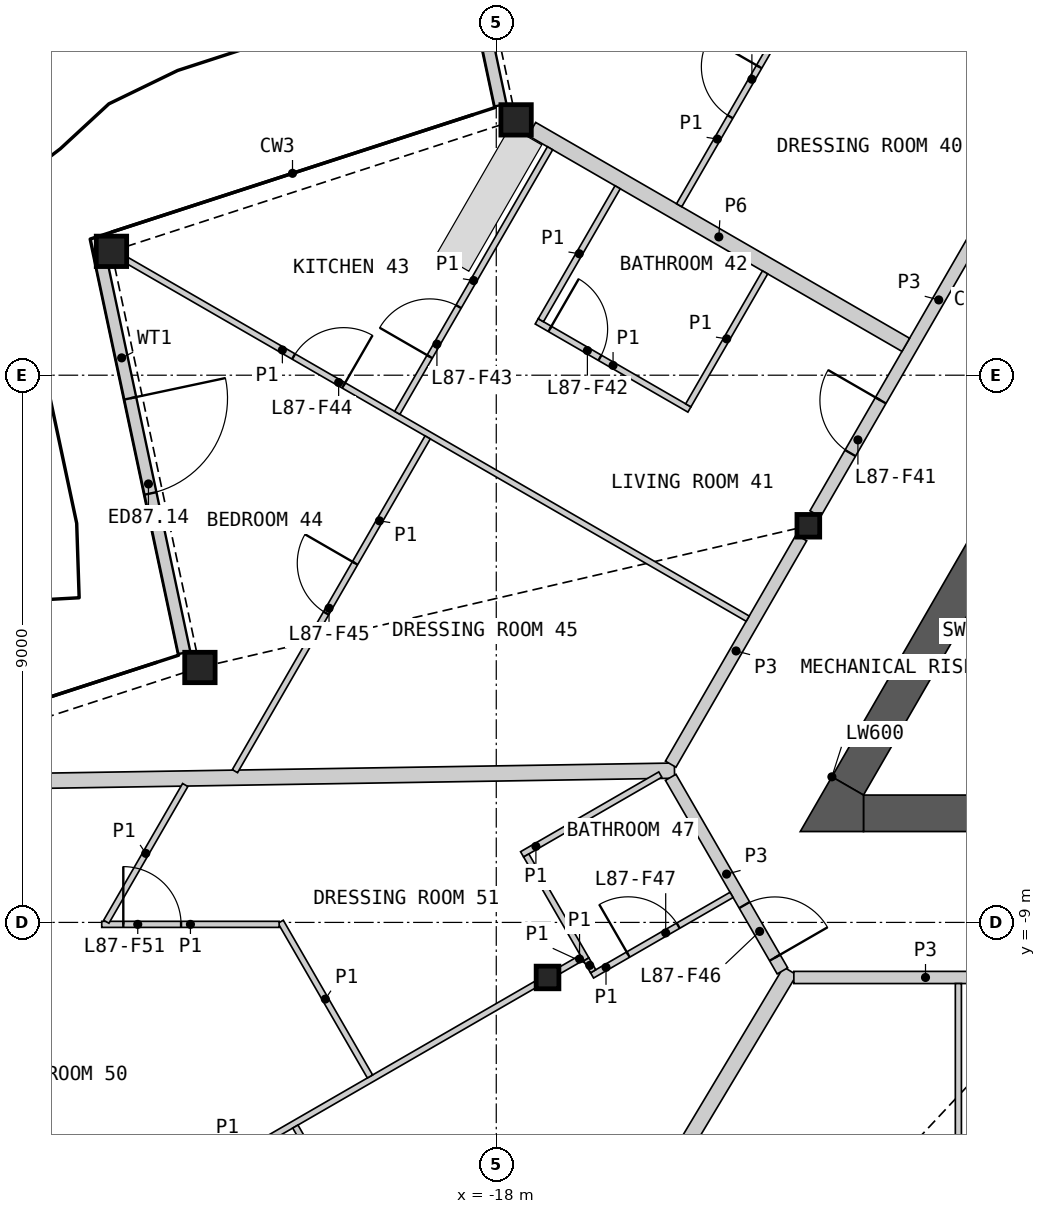
"""IFC4 building model, lengths in metres.
Left out: names, types, materials, properties, quantities, classifications, styles, units other than length and angle.
Written with IfcOpenShell. Run it as: python <this file> out.ifc"""

import sys

from ifc_helpers import new_model, si_unit, direction, frame, frame_2d, origin, origin_2d, place, context, subcontext, project, spatial, polyline, rectangle, hollow_rectangle, i_section, outline, extrude, element, fill, save


model = new_model("IFC4")
c1 = context("Model", 3, precision=1e-05, world=origin(), true_north=direction((0.0, 1.0)))
c2 = subcontext(c1, "Body", "Model", "MODEL_VIEW")
j1 = project(units=[si_unit("LENGTHUNIT", "METRE"), si_unit("PLANEANGLEUNIT", "RADIAN")], contexts=[c1])
p1 = place(None, origin())
s1 = spatial("IfcSite", under=j1, at=p1, CompositionType="ELEMENT")
p2 = place(p1, origin())
s2 = spatial("IfcBuilding", under=s1, at=p2, CompositionType="ELEMENT")
p3 = place(p2, frame((0.0, 0.0, 384.8)))
s3 = spatial("IfcBuildingStorey", under=s2, at=p3, CompositionType="ELEMENT", Elevation=384.8)
for number, where, z_axis, x_axis in (
    (1, (-17.674, 4.199, 0.0), (0.0, 0.0, 1.0), (1.0, 0.0, 0.0)),
    (2, (-24.329, 2.037, 0.0), (0.0, 0.0, 1.0), (1.0, 0.0, 0.0)),
    (3, (-22.874, -4.807, 0.0), (0.0, 0.0, 1.0), (1.0, 0.0, 0.0)),
):
    element("IfcColumn", number, at=place(p3, frame(where, z_axis=z_axis, x_axis=x_axis)), inside=s3, PredefinedType="COLUMN", context=c2, shape_type="SweptSolid", body=[
        extrude(hollow_rectangle(XDim=0.5, YDim=0.5, WallThickness=0.03, at=origin_2d()), origin(), (0.0, 0.0, 1.0), 3.4),
    ])
for number, where, z_axis, x_axis in (
    (4, (-12.868, -2.476, 0.0), (0.0, 0.0, 1.0), (1.0, 0.0, 0.0)),
    (5, (-17.157, -9.906, 0.0), (0.0, 0.0, 1.0), (1.0, 0.0, 0.0)),
):
    element("IfcColumn", number, at=place(p3, frame(where, z_axis=z_axis, x_axis=x_axis)), inside=s3, PredefinedType="COLUMN", context=c2, shape_type="SweptSolid", body=[
        extrude(i_section(OverallWidth=0.374, OverallDepth=0.372, WebThickness=0.016, FlangeThickness=0.026, at=origin_2d()), origin(), (0.0, 0.0, 1.0), 3.4),
    ])
p4 = place(p3, frame((-19.304, 10.909, 0.0), z_axis=(0.0, 0.0, 1.0), x_axis=(0.207882161022, -0.97815387702, 0.0)))
e6 = element("IfcWall", 6, at=p4, inside=s3, PredefinedType="SOLIDWALL", context=c2, shape_type="SweptSolid", body=[
    extrude(rectangle(XDim=6.612, YDim=0.2, at=frame_2d((3.306, 0.0))), origin(), (0.0, 0.0, 1.0), 2.634),
])
p5 = place(p4, frame((2.333, 0.0, 0.0)))
e7 = element("IfcOpeningElement", 7, at=p5, cuts=e6, PredefinedType="OPENING", context=c2, shape_type="SweptSolid", body=[
    extrude(rectangle(XDim=1.6, YDim=2.25, at=frame_2d((0.8, 1.125))), frame((0.0, 0.11, 0.0), z_axis=(0.0, -1.0, 0.0), x_axis=(1.0, 0.0, 0.0)), (0.0, 0.0, 1.0), 0.22),
])
p6 = place(p3, frame((-24.505, 1.902, 0.0), z_axis=(0.0, 0.0, 1.0), x_axis=(0.207917488951, -0.978146368285, 0.0)))
e8 = element("IfcWall", 8, at=p6, inside=s3, PredefinedType="SOLIDWALL", context=c2, shape_type="SweptSolid", body=[
    extrude(rectangle(XDim=6.612, YDim=0.2, at=frame_2d((3.306, 0.0))), origin(), (0.0, 0.0, 1.0), 2.634),
])
p7 = place(p6, frame((2.333, 0.0, 0.0)))
e9 = element("IfcOpeningElement", 9, at=p7, cuts=e8, PredefinedType="OPENING", context=c2, shape_type="SweptSolid", body=[
    extrude(rectangle(XDim=1.6, YDim=2.25, at=frame_2d((0.8, 1.125))), frame((0.0, 0.11, 0.0), z_axis=(0.0, -1.0, 0.0), x_axis=(1.0, 0.0, 0.0)), (0.0, 0.0, 1.0), 0.22),
])
p8 = place(p3, origin())
e10 = element("IfcWall", 10, at=p8, inside=s3, PredefinedType="SHEAR", context=c2, shape_type="SweptSolid", body=[
    extrude(outline(polyline([(-5.307, -1.281), (-10.374, -4.206), (-10.032, -4.298), (-5.182, -1.498), (-5.307, -1.281)])), origin(), (0.0, 0.0, 1.0), 3.1),
])
p9 = place(p3, origin())
e11 = element("IfcWall", 11, at=p9, inside=s3, PredefinedType="SHEAR", context=c2, shape_type="SweptSolid", body=[
    extrude(outline(polyline([(-10.374, -4.206), (-8.83, -6.881), (-8.738, -6.539), (-10.032, -4.298), (-10.374, -4.206)])), origin(), (0.0, 0.0, 1.0), 3.1),
])
p10 = place(p3, frame((-11.961, -7.206, 0.0), z_axis=(0.0, 0.0, 1.0), x_axis=(1.0, 0.0, 0.0)))
e12 = element("IfcWall", 12, at=p10, inside=s3, PredefinedType="SHEAR", context=c2, shape_type="SweptSolid", body=[
    extrude(rectangle(XDim=4.868, YDim=0.6, at=frame_2d((2.434, 0.0))), origin(), (0.0, 0.0, 1.0), 3.1),
])
p11 = place(p3, frame((-9.562, -2.15, 0.0), z_axis=(0.0, 0.0, 1.0), x_axis=(-0.500015214976, -0.866016619236, 0.0)))
e13 = element("IfcWall", 13, at=p11, inside=s3, PredefinedType="SHEAR", context=c2, shape_type="SweptSolid", body=[
    extrude(rectangle(XDim=5.318, YDim=0.6, at=frame_2d((2.659, 0.0))), origin(), (0.0, 0.0, 1.0), 3.1),
])
p12 = place(p3, origin())
e14 = element("IfcWall", 14, at=p12, inside=s3, PredefinedType="SHEAR", context=c2, shape_type="SweptSolid", body=[
    extrude(outline(polyline([(-12.48, -6.606), (-11.961, -6.906), (-11.961, -7.506), (-13.0, -7.506), (-12.48, -6.606)])), origin(), (0.0, 0.0, 1.0), 3.1),
])
p13 = place(p3, frame((-20.338, -21.771, 0.0), z_axis=(0.0, 0.0, 1.0), x_axis=(0.513878217441, 0.857863146218, 0.0)))
e15 = element("IfcWall", 15, at=p13, inside=s3, PredefinedType="PARTITIONING", context=c2, shape_type="SweptSolid", body=[
    extrude(rectangle(XDim=13.956, YDim=0.25, at=frame_2d((6.978, 0.0))), origin(), (0.0, 0.0, 1.0), 2.33),
])
p14 = place(p3, frame((-29.269, -6.732, 0.0), z_axis=(0.0, 0.0, 1.0), x_axis=(0.999870533117, 0.016090898164, 0.0)))
e16 = element("IfcWall", 16, at=p14, inside=s3, PredefinedType="PARTITIONING", context=c2, shape_type="SweptSolid", body=[
    extrude(rectangle(XDim=14.202, YDim=0.25, at=frame_2d((7.101, 0.0))), origin(), (0.0, 0.0, 1.0), 2.33),
])
p15 = place(p3, frame((-12.754, -2.279, 0.0), z_axis=(0.0, 0.0, 1.0), x_axis=(0.500001682468, 0.866024432409, 0.0)))
e17 = element("IfcWall", 17, at=p15, inside=s3, PredefinedType="PARTITIONING", context=c2, shape_type="SweptSolid", body=[
    extrude(rectangle(XDim=8.124, YDim=0.2, at=frame_2d((4.062, 0.0))), origin(), (0.0, 0.0, 1.0), 3.1),
])
p16 = place(p15, frame((1.153, 0.0, 0.0)))
e18 = element("IfcOpeningElement", 18, at=p16, cuts=e17, PredefinedType="OPENING", context=c2, shape_type="SweptSolid", body=[
    extrude(rectangle(XDim=1.0, YDim=2.1, at=frame_2d((0.5, 1.05))), frame((0.0, 0.11, 0.0), z_axis=(0.0, -1.0, 0.0), x_axis=(1.0, 0.0, 0.0)), (0.0, 0.0, 1.0), 0.22),
])
p17 = place(p3, frame((-17.414, 4.049, 0.0), z_axis=(0.0, 0.0, 1.0), x_axis=(0.866033839264, -0.499985389037, 0.0)))
e19 = element("IfcWall", 19, at=p17, inside=s3, PredefinedType="PARTITIONING", context=c2, shape_type="SweptSolid", body=[
    extrude(rectangle(XDim=7.1, YDim=0.25, at=frame_2d((3.55, 0.0))), origin(), (0.0, 0.0, 1.0), 2.33),
])
p18 = place(p3, frame((-13.106, -9.906, 0.0), z_axis=(0.0, 0.0, 1.0), x_axis=(1.0, 0.0, 0.0)))
e20 = element("IfcWall", 20, at=p18, inside=s3, PredefinedType="PARTITIONING", context=c2, shape_type="SweptSolid", body=[
    extrude(rectangle(XDim=4.331, YDim=0.2, at=frame_2d((2.165, 0.0))), origin(), (0.0, 0.0, 1.0), 3.1),
])
p19 = place(p3, frame((-15.131, -6.397, 0.0), z_axis=(0.0, 0.0, 1.0), x_axis=(0.499986217557, 0.866033360935, 0.0)))
e21 = element("IfcWall", 21, at=p19, inside=s3, PredefinedType="PARTITIONING", context=c2, shape_type="SweptSolid", body=[
    extrude(rectangle(XDim=4.3, YDim=0.2, at=frame_2d((2.15, 0.0))), origin(), (0.0, 0.0, 1.0), 3.1),
])
p20 = place(p3, frame((-15.131, -6.614, 0.0), z_axis=(0.0, 0.0, 1.0), x_axis=(0.499967746641, -0.866044024469, 0.0)))
e22 = element("IfcWall", 22, at=p20, inside=s3, PredefinedType="PARTITIONING", context=c2, shape_type="SweptSolid", body=[
    extrude(rectangle(XDim=3.676, YDim=0.2, at=frame_2d((1.838, 0.0))), origin(), (0.0, 0.0, 1.0), 3.1),
])
p21 = place(p20, frame((2.426, 0.0, 0.0)))
e23 = element("IfcOpeningElement", 23, at=p21, cuts=e22, PredefinedType="OPENING", context=c2, shape_type="SweptSolid", body=[
    extrude(rectangle(XDim=1.0, YDim=2.1, at=frame_2d((0.5, 1.05))), frame((0.0, 0.11, 0.0), z_axis=(0.0, -1.0, 0.0), x_axis=(1.0, 0.0, 0.0)), (0.0, 0.0, 1.0), 0.22),
])
p22 = place(p3, frame((-10.4, -21.828, 0.0), z_axis=(0.0, 0.0, 1.0), x_axis=(0.0, 1.0, 0.0)))
e24 = element("IfcWall", 24, at=p22, inside=s3, PredefinedType="PARTITIONING", context=c2, shape_type="SweptSolid", body=[
    extrude(rectangle(XDim=11.822, YDim=0.1, at=frame_2d((5.911, 0.0))), origin(), (0.0, 0.0, 1.0), 2.33),
])
p23 = place(p22, frame((1.156, 0.0, 0.0)))
e25 = element("IfcOpeningElement", 25, at=p23, cuts=e24, PredefinedType="OPENING", context=c2, shape_type="SweptSolid", body=[
    extrude(rectangle(XDim=0.95, YDim=2.1, at=frame_2d((0.475, 1.05))), frame((0.0, 0.06, 0.0), z_axis=(0.0, -1.0, 0.0), x_axis=(1.0, 0.0, 0.0)), (0.0, 0.0, 1.0), 0.12),
])
p24 = place(p3, frame((-24.069, 1.887, 0.0), z_axis=(0.0, 0.0, 1.0), x_axis=(0.866023404247, -0.500003463284, 0.0)))
e26 = element("IfcWall", 26, at=p24, inside=s3, PredefinedType="PARTITIONING", context=c2, shape_type="SweptSolid", body=[
    extrude(rectangle(XDim=11.782, YDim=0.1, at=frame_2d((5.891, 0.0))), origin(), (0.0, 0.0, 1.0), 2.33),
])
p25 = place(p24, frame((3.159, 0.0, 0.0)))
e27 = element("IfcOpeningElement", 27, at=p25, cuts=e26, PredefinedType="OPENING", context=c2, shape_type="SweptSolid", body=[
    extrude(rectangle(XDim=0.95, YDim=2.1, at=frame_2d((0.475, 1.05))), frame((0.0, 0.06, 0.0), z_axis=(0.0, -1.0, 0.0), x_axis=(1.0, 0.0, 0.0)), (0.0, 0.0, 1.0), 0.12),
])
p26 = place(p3, frame((-18.869, 10.894, 0.0), z_axis=(0.0, 0.0, 1.0), x_axis=(0.866023724155, -0.500002909193, 0.0)))
e28 = element("IfcWall", 28, at=p26, inside=s3, PredefinedType="PARTITIONING", context=c2, shape_type="SweptSolid", body=[
    extrude(rectangle(XDim=11.655, YDim=0.1, at=frame_2d((5.827, 0.0))), origin(), (0.0, 0.0, 1.0), 2.33),
])
p27 = place(p26, frame((6.253, 0.0, 0.0)))
e29 = element("IfcOpeningElement", 29, at=p27, cuts=e28, PredefinedType="OPENING", context=c2, shape_type="SweptSolid", body=[
    extrude(rectangle(XDim=0.95, YDim=2.1, at=frame_2d((0.475, 1.05))), frame((0.0, 0.06, 0.0), z_axis=(0.0, -1.0, 0.0), x_axis=(1.0, 0.0, 0.0)), (0.0, 0.0, 1.0), 0.12),
])
p28 = place(p3, frame((-26.777, -15.46, 0.0), z_axis=(0.0, 0.0, 1.0), x_axis=(0.866019680922, 0.500009912158, 0.0)))
e30 = element("IfcWall", 30, at=p28, inside=s3, PredefinedType="PARTITIONING", context=c2, shape_type="SweptSolid", body=[
    extrude(rectangle(XDim=10.881, YDim=0.1, at=frame_2d((5.44, 0.0))), origin(), (0.0, 0.0, 1.0), 2.33),
])
p29 = place(p28, frame((1.454, 0.0, 0.0)))
e31 = element("IfcOpeningElement", 31, at=p29, cuts=e30, PredefinedType="OPENING", context=c2, shape_type="SweptSolid", body=[
    extrude(rectangle(XDim=0.95, YDim=2.1, at=frame_2d((0.475, 1.05))), frame((0.0, 0.06, 0.0), z_axis=(0.0, -1.0, 0.0), x_axis=(1.0, 0.0, 0.0)), (0.0, 0.0, 1.0), 0.12),
])
p30 = place(p3, frame((-21.304, -12.358, 0.0), z_axis=(0.0, 0.0, 1.0), x_axis=(0.500000558108, -0.866025081561, 0.0)))
e32 = element("IfcWall", 32, at=p30, inside=s3, PredefinedType="PARTITIONING", context=c2, shape_type="SweptSolid", body=[
    extrude(rectangle(XDim=6.358, YDim=0.1, at=frame_2d((3.179, 0.0))), origin(), (0.0, 0.0, 1.0), 2.33),
])
p31 = place(p30, frame((3.555, 0.0, 0.0)))
e33 = element("IfcOpeningElement", 33, at=p31, cuts=e32, PredefinedType="OPENING", context=c2, shape_type="SweptSolid", body=[
    extrude(rectangle(XDim=0.95, YDim=2.1, at=frame_2d((0.475, 1.05))), frame((0.0, 0.06, 0.0), z_axis=(0.0, -1.0, 0.0), x_axis=(1.0, 0.0, 0.0)), (0.0, 0.0, 1.0), 0.12),
])
p32 = place(p3, frame((-22.298, -6.512, 0.0), z_axis=(0.0, 0.0, 1.0), x_axis=(0.499991387631, 0.866030376081, 0.0)))
e34 = element("IfcWall", 34, at=p32, inside=s3, PredefinedType="PARTITIONING", context=c2, shape_type="SweptSolid", body=[
    extrude(rectangle(XDim=6.339, YDim=0.1, at=frame_2d((3.169, 0.0))), origin(), (0.0, 0.0, 1.0), 2.33),
])
p33 = place(p32, frame((3.0, 0.0, 0.0)))
e35 = element("IfcOpeningElement", 35, at=p33, cuts=e34, PredefinedType="OPENING", context=c2, shape_type="SweptSolid", body=[
    extrude(rectangle(XDim=0.95, YDim=2.1, at=frame_2d((0.475, 1.05))), frame((0.0, 0.06, 0.0), z_axis=(0.0, -1.0, 0.0), x_axis=(1.0, 0.0, 0.0)), (0.0, 0.0, 1.0), 0.12),
])
p34 = place(p3, frame((-19.628, -0.619, 0.0), z_axis=(0.0, 0.0, 1.0), x_axis=(0.499990214365, 0.86603105345, 0.0)))
e36 = element("IfcWall", 36, at=p34, inside=s3, PredefinedType="PARTITIONING", context=c2, shape_type="SweptSolid", body=[
    extrude(rectangle(XDim=5.025, YDim=0.1, at=frame_2d((2.512, 0.0))), origin(), (0.0, 0.0, 1.0), 2.33),
])
p35 = place(p34, frame((1.067, 0.0, 0.0)))
e37 = element("IfcOpeningElement", 37, at=p35, cuts=e36, PredefinedType="OPENING", context=c2, shape_type="SweptSolid", body=[
    extrude(rectangle(XDim=0.95, YDim=2.1, at=frame_2d((0.475, 1.05))), frame((0.0, 0.06, 0.0), z_axis=(0.0, -1.0, 0.0), x_axis=(1.0, 0.0, 0.0)), (0.0, 0.0, 1.0), 0.12),
])
p36 = place(p3, frame((-14.992, 2.796, 0.0), z_axis=(0.0, 0.0, 1.0), x_axis=(0.499990214365, 0.86603105345, 0.0)))
e38 = element("IfcWall", 38, at=p36, inside=s3, PredefinedType="PARTITIONING", context=c2, shape_type="SweptSolid", body=[
    extrude(rectangle(XDim=5.025, YDim=0.1, at=frame_2d((2.512, 0.0))), origin(), (0.0, 0.0, 1.0), 2.33),
])
p37 = place(p36, frame((1.68, 0.0, 0.0)))
e39 = element("IfcOpeningElement", 39, at=p37, cuts=e38, PredefinedType="OPENING", context=c2, shape_type="SweptSolid", body=[
    extrude(rectangle(XDim=0.95, YDim=2.1, at=frame_2d((0.475, 1.05))), frame((0.0, 0.06, 0.0), z_axis=(0.0, -1.0, 0.0), x_axis=(1.0, 0.0, 0.0)), (0.0, 0.0, 1.0), 0.12),
])
p38 = place(p3, frame((-21.546, -8.989, 0.0), z_axis=(0.0, 0.0, 1.0), x_axis=(0.499919039967, -0.866072141036, 0.0)))
e40 = element("IfcWall", 40, at=p38, inside=s3, PredefinedType="PARTITIONING", context=c2, shape_type="SweptSolid", body=[
    extrude(rectangle(XDim=2.938, YDim=0.1, at=frame_2d((1.469, 0.0))), origin(), (0.0, 0.0, 1.0), 2.33),
])
p39 = place(p3, frame((-24.489, -9.032, 0.0), z_axis=(0.0, 0.0, 1.0), x_axis=(1.0, 0.0, 0.0)))
e41 = element("IfcWall", 41, at=p39, inside=s3, PredefinedType="PARTITIONING", context=c2, shape_type="SweptSolid", body=[
    extrude(rectangle(XDim=2.917, YDim=0.1, at=frame_2d((1.459, 0.0))), origin(), (0.0, 0.0, 1.0), 2.33),
])
p40 = place(p39, frame((0.355, 0.0, 0.0)))
e42 = element("IfcOpeningElement", 42, at=p40, cuts=e41, PredefinedType="OPENING", context=c2, shape_type="SweptSolid", body=[
    extrude(rectangle(XDim=0.95, YDim=2.1, at=frame_2d((0.475, 1.05))), frame((0.0, 0.06, 0.0), z_axis=(0.0, -1.0, 0.0), x_axis=(1.0, 0.0, 0.0)), (0.0, 0.0, 1.0), 0.12),
])
p41 = place(p3, frame((-17.335, 0.886, 0.0), z_axis=(0.0, 0.0, 1.0), x_axis=(0.866032775405, -0.499987231761, 0.0)))
e43 = element("IfcWall", 43, at=p41, inside=s3, PredefinedType="PARTITIONING", context=c2, shape_type="SweptSolid", body=[
    extrude(rectangle(XDim=2.9, YDim=0.1, at=frame_2d((1.45, 0.0))), origin(), (0.0, 0.0, 1.0), 2.33),
])
p42 = place(p41, frame((0.25, 0.0, 0.0)))
e44 = element("IfcOpeningElement", 44, at=p42, cuts=e43, PredefinedType="OPENING", context=c2, shape_type="SweptSolid", body=[
    extrude(rectangle(XDim=0.95, YDim=2.1, at=frame_2d((0.475, 1.05))), frame((0.0, 0.06, 0.0), z_axis=(0.0, -1.0, 0.0), x_axis=(1.0, 0.0, 0.0)), (0.0, 0.0, 1.0), 0.12),
])
p43 = place(p3, frame((-24.414, -8.989, 0.0), z_axis=(0.0, 0.0, 1.0), x_axis=(0.500042595688, 0.866000809756, 0.0)))
e45 = element("IfcWall", 45, at=p43, inside=s3, PredefinedType="PARTITIONING", context=c2, shape_type="SweptSolid", body=[
    extrude(rectangle(XDim=2.596, YDim=0.1, at=frame_2d((1.298, 0.0))), origin(), (0.0, 0.0, 1.0), 2.33),
])
p44 = place(p3, frame((-17.575, -7.881, 0.0), z_axis=(0.0, 0.0, 1.0), x_axis=(0.866036909293, 0.499980071345, 0.0)))
e46 = element("IfcWall", 46, at=p44, inside=s3, PredefinedType="PARTITIONING", context=c2, shape_type="SweptSolid", body=[
    extrude(rectangle(XDim=2.625, YDim=0.1, at=frame_2d((1.312, 0.0))), origin(), (0.0, 0.0, 1.0), 2.33),
])
p45 = place(p3, frame((-17.267, 0.905, 0.0), z_axis=(0.0, 0.0, 1.0), x_axis=(0.499976333282, 0.866039067339, 0.0)))
e47 = element("IfcWall", 47, at=p45, inside=s3, PredefinedType="PARTITIONING", context=c2, shape_type="SweptSolid", body=[
    extrude(rectangle(XDim=2.525, YDim=0.1, at=frame_2d((1.262, 0.0))), origin(), (0.0, 0.0, 1.0), 2.33),
])
p46 = place(p3, frame((-14.842, -0.496, 0.0), z_axis=(0.0, 0.0, 1.0), x_axis=(0.500048846702, 0.865997200291, 0.0)))
e48 = element("IfcWall", 48, at=p46, inside=s3, PredefinedType="PARTITIONING", context=c2, shape_type="SweptSolid", body=[
    extrude(rectangle(XDim=2.525, YDim=0.1, at=frame_2d((1.263, 0.0))), origin(), (0.0, 0.0, 1.0), 2.33),
])
p47 = place(p3, frame((-16.425, -9.872, 0.0), z_axis=(0.0, 0.0, 1.0), x_axis=(0.86603978909, 0.499975083092, 0.0)))
e49 = element("IfcWall", 49, at=p47, inside=s3, PredefinedType="PARTITIONING", context=c2, shape_type="SweptSolid", body=[
    extrude(rectangle(XDim=2.649, YDim=0.1, at=frame_2d((1.325, 0.0))), origin(), (0.0, 0.0, 1.0), 2.33),
])
p48 = place(p47, frame((0.686, 0.0, 0.0)))
e50 = element("IfcOpeningElement", 50, at=p48, cuts=e49, PredefinedType="OPENING", context=c2, shape_type="SweptSolid", body=[
    extrude(rectangle(XDim=0.95, YDim=2.1, at=frame_2d((0.475, 1.05))), frame((0.0, 0.06, 0.0), z_axis=(0.0, -1.0, 0.0), x_axis=(1.0, 0.0, 0.0)), (0.0, 0.0, 1.0), 0.12),
])
p49 = place(p3, frame((-17.507, -7.899, 0.0), z_axis=(0.0, 0.0, 1.0), x_axis=(0.500011643316, -0.866018681408, 0.0)))
e51 = element("IfcWall", 51, at=p49, inside=s3, PredefinedType="PARTITIONING", context=c2, shape_type="SweptSolid", body=[
    extrude(rectangle(XDim=1.973, YDim=0.1, at=frame_2d((0.987, 0.0))), origin(), (0.0, 0.0, 1.0), 2.33),
])
p50 = place(p3, frame((-16.96, -9.792, 0.0), z_axis=(0.0, 0.0, 1.0), x_axis=(0.866137484628, 0.499805820016, 0.0)))
e52 = element("IfcWall", 52, at=p50, inside=s3, PredefinedType="PARTITIONING", context=c2, shape_type="SweptSolid", body=[
    extrude(rectangle(XDim=0.423, YDim=0.1, at=frame_2d((0.211, 0.0))), origin(), (0.0, 0.0, 1.0), 2.33),
])
p51 = place(p3, frame((-16.519, -9.61, 0.0), z_axis=(0.0, 0.0, 1.0), x_axis=(0.50245032488, -0.864606078528, 0.0)))
e53 = element("IfcWall", 53, at=p51, inside=s3, PredefinedType="PARTITIONING", context=c2, shape_type="SweptSolid", body=[
    extrude(rectangle(XDim=0.224, YDim=0.1, at=frame_2d((0.112, 0.0))), origin(), (0.0, 0.0, 1.0), 2.33),
])
p52 = place(p7, origin())
e54 = element("IfcDoor", 54, at=p52, inside=s3, OperationType="DOUBLE_DOOR_SINGLE_SWING", PredefinedType="DOOR", context=c2, shape_type="SweptSolid", body=[
    extrude(rectangle(XDim=1.6, YDim=2.25, at=frame_2d((0.8, 1.125))), frame((0.0, 0.025, 0.0), z_axis=(0.0, -1.0, 0.0), x_axis=(1.0, 0.0, 0.0)), (0.0, 0.0, 1.0), 0.05),
])
fill(e9, e54)
p53 = place(p37, origin())
e55 = element("IfcDoor", 55, at=p53, inside=s3, OperationType="SINGLE_SWING_RIGHT", PredefinedType="DOOR", context=c2, shape_type="SweptSolid", body=[
    extrude(rectangle(XDim=0.95, YDim=2.1, at=frame_2d((0.475, 1.05))), frame((0.0, 0.025, 0.0), z_axis=(0.0, -1.0, 0.0), x_axis=(1.0, 0.0, 0.0)), (0.0, 0.0, 1.0), 0.05),
])
fill(e39, e55)
p54 = place(p16, origin())
e56 = element("IfcDoor", 56, at=p54, inside=s3, OperationType="SINGLE_SWING_RIGHT", PredefinedType="DOOR", context=c2, shape_type="SweptSolid", body=[
    extrude(rectangle(XDim=1.0, YDim=2.1, at=frame_2d((0.5, 1.05))), frame((0.0, 0.025, 0.0), z_axis=(0.0, -1.0, 0.0), x_axis=(1.0, 0.0, 0.0)), (0.0, 0.0, 1.0), 0.05),
])
fill(e18, e56)
p55 = place(p42, origin())
e57 = element("IfcDoor", 57, at=p55, inside=s3, OperationType="SINGLE_SWING_LEFT", PredefinedType="DOOR", context=c2, shape_type="SweptSolid", body=[
    extrude(rectangle(XDim=0.95, YDim=2.1, at=frame_2d((0.475, 1.05))), frame((0.0, 0.025, 0.0), z_axis=(0.0, -1.0, 0.0), x_axis=(1.0, 0.0, 0.0)), (0.0, 0.0, 1.0), 0.05),
])
fill(e44, e57)
p56 = place(p35, origin())
e58 = element("IfcDoor", 58, at=p56, inside=s3, OperationType="SINGLE_SWING_LEFT", PredefinedType="DOOR", context=c2, shape_type="SweptSolid", body=[
    extrude(rectangle(XDim=0.95, YDim=2.1, at=frame_2d((0.475, 1.05))), frame((0.0, 0.025, 0.0), z_axis=(0.0, -1.0, 0.0), x_axis=(1.0, 0.0, 0.0)), (0.0, 0.0, 1.0), 0.05),
])
fill(e37, e58)
p57 = place(p25, origin())
e59 = element("IfcDoor", 59, at=p57, inside=s3, OperationType="SINGLE_SWING_RIGHT", PredefinedType="DOOR", context=c2, shape_type="SweptSolid", body=[
    extrude(rectangle(XDim=0.95, YDim=2.1, at=frame_2d((0.475, 1.05))), frame((0.0, 0.025, 0.0), z_axis=(0.0, -1.0, 0.0), x_axis=(1.0, 0.0, 0.0)), (0.0, 0.0, 1.0), 0.05),
])
fill(e27, e59)
p58 = place(p33, origin())
e60 = element("IfcDoor", 60, at=p58, inside=s3, OperationType="SINGLE_SWING_RIGHT", PredefinedType="DOOR", context=c2, shape_type="SweptSolid", body=[
    extrude(rectangle(XDim=0.95, YDim=2.1, at=frame_2d((0.475, 1.05))), frame((0.0, 0.025, 0.0), z_axis=(0.0, -1.0, 0.0), x_axis=(1.0, 0.0, 0.0)), (0.0, 0.0, 1.0), 0.05),
])
fill(e35, e60)
p59 = place(p21, origin())
e61 = element("IfcDoor", 61, at=p59, inside=s3, OperationType="SINGLE_SWING_RIGHT", PredefinedType="DOOR", context=c2, shape_type="SweptSolid", body=[
    extrude(rectangle(XDim=1.0, YDim=2.1, at=frame_2d((0.5, 1.05))), frame((0.0, 0.025, 0.0), z_axis=(0.0, -1.0, 0.0), x_axis=(1.0, 0.0, 0.0)), (0.0, 0.0, 1.0), 0.05),
])
fill(e23, e61)
p60 = place(p48, origin())
e62 = element("IfcDoor", 62, at=p60, inside=s3, OperationType="SINGLE_SWING_LEFT", PredefinedType="DOOR", context=c2, shape_type="SweptSolid", body=[
    extrude(rectangle(XDim=0.95, YDim=2.1, at=frame_2d((0.475, 1.05))), frame((0.0, 0.025, 0.0), z_axis=(0.0, -1.0, 0.0), x_axis=(1.0, 0.0, 0.0)), (0.0, 0.0, 1.0), 0.05),
])
fill(e50, e62)
p61 = place(p40, origin())
e63 = element("IfcDoor", 63, at=p61, inside=s3, OperationType="SINGLE_SWING_LEFT", PredefinedType="DOOR", context=c2, shape_type="SweptSolid", body=[
    extrude(rectangle(XDim=0.95, YDim=2.1, at=frame_2d((0.475, 1.05))), frame((0.0, 0.025, 0.0), z_axis=(0.0, -1.0, 0.0), x_axis=(1.0, 0.0, 0.0)), (0.0, 0.0, 1.0), 0.05),
])
fill(e42, e63)
save(model, sys.argv[1])
